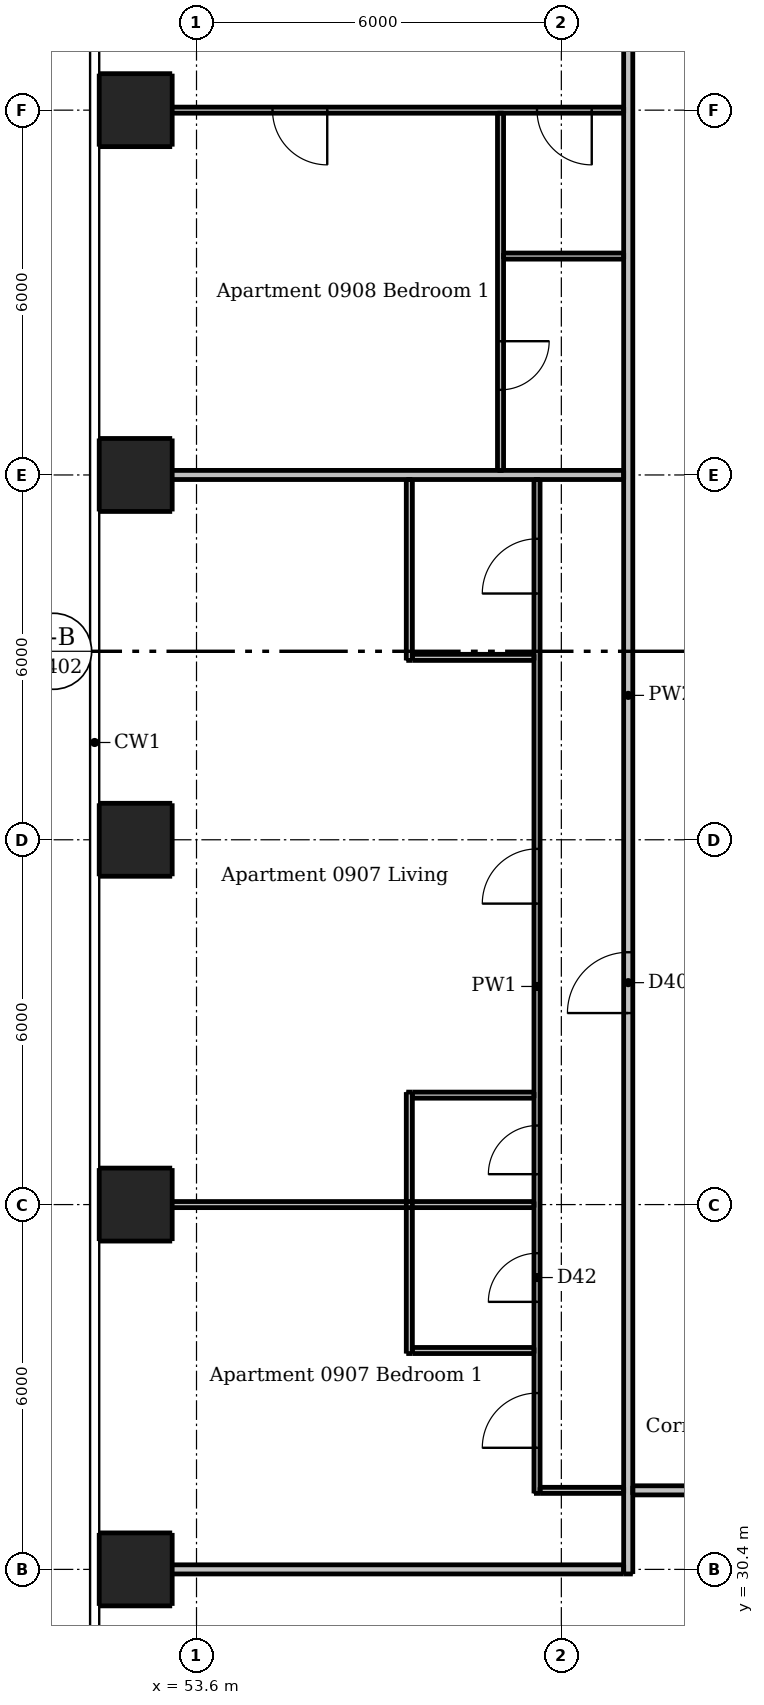
"""IFC4 building model, lengths in metres.
Left out: names, types, materials, properties, quantities, classifications, styles, units other than length and angle.
Written with IfcOpenShell. Run it as: python <this file> out.ifc"""

import sys

from ifc_helpers import new_model, si_unit, direction, frame, frame_2d, origin, origin_2d, place, context, subcontext, project, spatial, rectangle, extrude, element, fill, save


model = new_model("IFC4")
c1 = context("Model", 3, precision=1e-05, world=origin(), true_north=direction((0.0, 1.0)))
c2 = subcontext(c1, "Body", "Model", "MODEL_VIEW")
j1 = project(units=[si_unit("LENGTHUNIT", "METRE"), si_unit("PLANEANGLEUNIT", "RADIAN")], contexts=[c1])
p1 = place(None, origin())
s1 = spatial("IfcSite", under=j1, at=p1, CompositionType="ELEMENT")
p2 = place(p1, origin())
s2 = spatial("IfcBuilding", under=s1, at=p2, CompositionType="ELEMENT")
p3 = place(p2, frame((0.0, 0.0, 36.7)))
s3 = spatial("IfcBuildingStorey", under=s2, at=p3, CompositionType="ELEMENT", Elevation=36.7)
for number, where, z_axis, x_axis in (
    (1, (52.6, 30.4, 0.0), (0.0, 0.0, 1.0), (1.0, 0.0, 0.0)),
    (2, (52.6, 36.4, 0.0), (0.0, 0.0, 1.0), (1.0, 0.0, 0.0)),
    (3, (52.6, 42.4, 0.0), (0.0, 0.0, 1.0), (1.0, 0.0, 0.0)),
    (4, (52.6, 48.4, 0.0), (0.0, 0.0, 1.0), (1.0, 0.0, 0.0)),
    (5, (52.6, 54.4, 0.0), (0.0, 0.0, 1.0), (1.0, 0.0, 0.0)),
):
    element("IfcColumn", number, at=place(p3, frame(where, z_axis=z_axis, x_axis=x_axis)), inside=s3, PredefinedType="COLUMN", context=c2, shape_type="SweptSolid", body=[
        extrude(rectangle(XDim=1.2, YDim=1.2, at=origin_2d()), origin(), (0.0, 0.0, 1.0), 3.05),
    ])
p4 = place(p3, frame((57.1, 33.95, 0.0), z_axis=(0.0, 0.0, 1.0), x_axis=(0.0, 1.0, 0.0)))
e6 = element("IfcWall", 6, at=p4, inside=s3, PredefinedType="PARTITIONING", context=c2, shape_type="SweptSolid", body=[
    extrude(rectangle(XDim=4.3, YDim=0.1, at=frame_2d((2.15, 0.0))), origin(), (0.0, 0.0, 1.0), 3.05),
])
p5 = place(p3, frame((57.1, 45.35, 0.0), z_axis=(0.0, 0.0, 1.0), x_axis=(0.0, 1.0, 0.0)))
e7 = element("IfcWall", 7, at=p5, inside=s3, PredefinedType="PARTITIONING", context=c2, shape_type="SweptSolid", body=[
    extrude(rectangle(XDim=2.975, YDim=0.1, at=frame_2d((1.487, 0.0))), origin(), (0.0, 0.0, 1.0), 3.05),
])
p6 = place(p3, frame((58.6, 54.35, 0.0), z_axis=(0.0, 0.0, 1.0), x_axis=(0.0, -1.0, 0.0)))
e8 = element("IfcWall", 8, at=p6, inside=s3, PredefinedType="PARTITIONING", context=c2, shape_type="SweptSolid", body=[
    extrude(rectangle(XDim=5.875, YDim=0.1, at=frame_2d((2.938, 0.0))), origin(), (0.0, 0.0, 1.0), 3.05),
])
p7 = place(p6, frame((3.75, 0.0, 0.0)))
e9 = element("IfcOpeningElement", 9, at=p7, cuts=e8, PredefinedType="OPENING", context=c2, shape_type="SweptSolid", body=[
    extrude(rectangle(XDim=0.8, YDim=2.1, at=frame_2d((0.4, 1.05))), frame((0.0, 0.06, 0.0), z_axis=(0.0, -1.0, 0.0), x_axis=(1.0, 0.0, 0.0)), (0.0, 0.0, 1.0), 0.12),
])
p8 = place(p3, frame((59.2, 31.65, 0.0), z_axis=(0.0, 0.0, 1.0), x_axis=(0.0, 1.0, 0.0)))
e10 = element("IfcWall", 10, at=p8, inside=s3, PredefinedType="PARTITIONING", context=c2, shape_type="SweptSolid", body=[
    extrude(rectangle(XDim=16.675, YDim=0.1, at=frame_2d((8.337, 0.0))), origin(), (0.0, 0.0, 1.0), 3.05),
])
p9 = place(p8, frame((9.7, 0.0, 0.0)))
e11 = element("IfcOpeningElement", 11, at=p9, cuts=e10, PredefinedType="OPENING", context=c2, shape_type="SweptSolid", body=[
    extrude(rectangle(XDim=0.9, YDim=2.1, at=frame_2d((0.45, 1.05))), frame((0.0, 0.06, 0.0), z_axis=(0.0, -1.0, 0.0), x_axis=(1.0, 0.0, 0.0)), (0.0, 0.0, 1.0), 0.12),
])
p10 = place(p8, frame((14.8, 0.0, 0.0)))
e12 = element("IfcOpeningElement", 12, at=p10, cuts=e10, PredefinedType="OPENING", context=c2, shape_type="SweptSolid", body=[
    extrude(rectangle(XDim=0.9, YDim=2.1, at=frame_2d((0.45, 1.05))), frame((0.0, 0.06, 0.0), z_axis=(0.0, -1.0, 0.0), x_axis=(1.0, 0.0, 0.0)), (0.0, 0.0, 1.0), 0.12),
])
p11 = place(p8, frame((5.25, 0.0, 0.0)))
e13 = element("IfcOpeningElement", 13, at=p11, cuts=e10, PredefinedType="OPENING", context=c2, shape_type="SweptSolid", body=[
    extrude(rectangle(XDim=0.8, YDim=2.1, at=frame_2d((0.4, 1.05))), frame((0.0, 0.06, 0.0), z_axis=(0.0, -1.0, 0.0), x_axis=(1.0, 0.0, 0.0)), (0.0, 0.0, 1.0), 0.12),
])
p12 = place(p8, frame((0.75, 0.0, 0.0)))
e14 = element("IfcOpeningElement", 14, at=p12, cuts=e10, PredefinedType="OPENING", context=c2, shape_type="SweptSolid", body=[
    extrude(rectangle(XDim=0.9, YDim=2.1, at=frame_2d((0.45, 1.05))), frame((0.0, 0.06, 0.0), z_axis=(0.0, -1.0, 0.0), x_axis=(1.0, 0.0, 0.0)), (0.0, 0.0, 1.0), 0.12),
])
p13 = place(p8, frame((3.15, 0.0, 0.0)))
e15 = element("IfcOpeningElement", 15, at=p13, cuts=e10, PredefinedType="OPENING", context=c2, shape_type="SweptSolid", body=[
    extrude(rectangle(XDim=0.8, YDim=2.1, at=frame_2d((0.4, 1.05))), frame((0.0, 0.06, 0.0), z_axis=(0.0, -1.0, 0.0), x_axis=(1.0, 0.0, 0.0)), (0.0, 0.0, 1.0), 0.12),
])
p14 = place(p3, frame((60.625, 54.4, 0.0), z_axis=(0.0, 0.0, 1.0), x_axis=(-1.0, 0.0, 0.0)))
e16 = element("IfcWall", 16, at=p14, inside=s3, PredefinedType="PARTITIONING", context=c2, shape_type="SweptSolid", body=[
    extrude(rectangle(XDim=8.625, YDim=0.1, at=frame_2d((4.312, 0.0))), origin(), (0.0, 0.0, 1.0), 2.516),
])
p15 = place(p14, frame((0.525, 0.0, 0.0)))
e17 = element("IfcOpeningElement", 17, at=p15, cuts=e16, PredefinedType="OPENING", context=c2, shape_type="SweptSolid", body=[
    extrude(rectangle(XDim=0.9, YDim=2.1, at=frame_2d((0.45, 1.05))), frame((0.0, 0.06, 0.0), z_axis=(0.0, -1.0, 0.0), x_axis=(1.0, 0.0, 0.0)), (0.0, 0.0, 1.0), 0.12),
])
p16 = place(p14, frame((4.875, 0.0, 0.0)))
e18 = element("IfcOpeningElement", 18, at=p16, cuts=e16, PredefinedType="OPENING", context=c2, shape_type="SweptSolid", body=[
    extrude(rectangle(XDim=0.9, YDim=2.1, at=frame_2d((0.45, 1.05))), frame((0.0, 0.06, 0.0), z_axis=(0.0, -1.0, 0.0), x_axis=(1.0, 0.0, 0.0)), (0.0, 0.0, 1.0), 0.12),
])
p17 = place(p3, frame((58.65, 52.0, 0.0), z_axis=(0.0, 0.0, 1.0), x_axis=(1.0, 0.0, 0.0)))
e19 = element("IfcWall", 19, at=p17, inside=s3, PredefinedType="PARTITIONING", context=c2, shape_type="SweptSolid", body=[
    extrude(rectangle(XDim=1.975, YDim=0.1, at=frame_2d((0.988, 0.0))), origin(), (0.0, 0.0, 1.0), 3.05),
])
for number, where, z_axis, x_axis in (
    (20, (57.15, 45.4, 0.0), (0.0, 0.0, 1.0), (1.0, 0.0, 0.0)),
    (21, (57.15, 38.2, 0.0), (0.0, 0.0, 1.0), (1.0, 0.0, 0.0)),
):
    element("IfcWall", number, at=place(p3, frame(where, z_axis=z_axis, x_axis=x_axis)), inside=s3, PredefinedType="PARTITIONING", context=c2, shape_type="SweptSolid", body=[
        extrude(rectangle(XDim=2.0, YDim=0.1, at=frame_2d((1.0, 0.0))), origin(), (0.0, 0.0, 1.0), 3.05),
    ])
p18 = place(p3, frame((52.0, 36.4, 0.0), z_axis=(0.0, 0.0, 1.0), x_axis=(1.0, 0.0, 0.0)))
e22 = element("IfcWall", 22, at=p18, inside=s3, PredefinedType="PARTITIONING", context=c2, shape_type="SweptSolid", body=[
    extrude(rectangle(XDim=7.15, YDim=0.1, at=frame_2d((3.575, 0.0))), origin(), (0.0, 0.0, 1.0), 2.516),
])
p19 = place(p3, frame((57.15, 34.0, 0.0), z_axis=(0.0, 0.0, 1.0), x_axis=(1.0, 0.0, 0.0)))
e23 = element("IfcWall", 23, at=p19, inside=s3, PredefinedType="PARTITIONING", context=c2, shape_type="SweptSolid", body=[
    extrude(rectangle(XDim=2.0, YDim=0.1, at=frame_2d((1.0, 0.0))), origin(), (0.0, 0.0, 1.0), 3.05),
])
p20 = place(p3, frame((59.25, 31.7, 0.0), z_axis=(0.0, 0.0, 1.0), x_axis=(1.0, 0.0, 0.0)))
e24 = element("IfcWall", 24, at=p20, inside=s3, PredefinedType="PARTITIONING", context=c2, shape_type="SweptSolid", body=[
    extrude(rectangle(XDim=1.375, YDim=0.1, at=frame_2d((0.688, 0.0))), origin(), (0.0, 0.0, 1.0), 3.05),
])
p21 = place(p3, frame((60.7, 30.325, 0.0), z_axis=(0.0, 0.0, 1.0), x_axis=(0.0, 1.0, 0.0)))
e25 = element("IfcWall", 25, at=p21, inside=s3, PredefinedType="PARTITIONING", context=c2, shape_type="SweptSolid", body=[
    extrude(rectangle(XDim=28.9, YDim=0.15, at=frame_2d((14.45, 0.0))), origin(), (0.0, 0.0, 1.0), 3.05),
])
p22 = place(p21, frame((9.225, 0.0, 0.0)))
e26 = element("IfcOpeningElement", 26, at=p22, cuts=e25, PredefinedType="OPENING", context=c2, shape_type="SweptSolid", body=[
    extrude(rectangle(XDim=1.0, YDim=2.1, at=frame_2d((0.5, 1.05))), frame((0.0, 0.085, 0.0), z_axis=(0.0, -1.0, 0.0), x_axis=(1.0, 0.0, 0.0)), (0.0, 0.0, 1.0), 0.17),
])
p23 = place(p21, frame((26.025, 0.0, 0.0)))
e27 = element("IfcOpeningElement", 27, at=p23, cuts=e25, PredefinedType="OPENING", context=c2, shape_type="SweptSolid", body=[
    extrude(rectangle(XDim=1.0, YDim=2.1, at=frame_2d((0.5, 1.05))), frame((0.0, 0.085, 0.0), z_axis=(0.0, -1.0, 0.0), x_axis=(1.0, 0.0, 0.0)), (0.0, 0.0, 1.0), 0.17),
])
p24 = place(p3, frame((52.0, 48.4, 0.0), z_axis=(0.0, 0.0, 1.0), x_axis=(1.0, 0.0, 0.0)))
e28 = element("IfcWall", 28, at=p24, inside=s3, PredefinedType="PARTITIONING", context=c2, shape_type="SweptSolid", body=[
    extrude(rectangle(XDim=8.625, YDim=0.15, at=frame_2d((4.312, 0.0))), origin(), (0.0, 0.0, 1.0), 2.516),
])
p25 = place(p3, frame((89.525, 31.7, 0.0), z_axis=(0.0, 0.0, 1.0), x_axis=(-1.0, 0.0, 0.0)))
e29 = element("IfcWall", 29, at=p25, inside=s3, PredefinedType="PARTITIONING", context=c2, shape_type="SweptSolid", body=[
    extrude(rectangle(XDim=28.75, YDim=0.15, at=frame_2d((14.375, 0.0))), origin(), (0.0, 0.0, 1.0), 3.05),
])
p26 = place(p25, frame((24.475, 0.0, 0.0)))
e30 = element("IfcOpeningElement", 30, at=p26, cuts=e29, PredefinedType="OPENING", context=c2, shape_type="SweptSolid", body=[
    extrude(rectangle(XDim=1.0, YDim=2.1, at=frame_2d((0.5, 1.05))), frame((0.0, 0.085, 0.0), z_axis=(0.0, -1.0, 0.0), x_axis=(1.0, 0.0, 0.0)), (0.0, 0.0, 1.0), 0.17),
])
p27 = place(p25, frame((7.575, 0.0, 0.0)))
e31 = element("IfcOpeningElement", 31, at=p27, cuts=e29, PredefinedType="OPENING", context=c2, shape_type="SweptSolid", body=[
    extrude(rectangle(XDim=1.0, YDim=2.1, at=frame_2d((0.5, 1.05))), frame((0.0, 0.085, 0.0), z_axis=(0.0, -1.0, 0.0), x_axis=(1.0, 0.0, 0.0)), (0.0, 0.0, 1.0), 0.17),
])
p28 = place(p3, frame((52.0, 30.4, 0.0), z_axis=(0.0, 0.0, 1.0), x_axis=(1.0, 0.0, 0.0)))
e32 = element("IfcWall", 32, at=p28, inside=s3, PredefinedType="PARTITIONING", context=c2, shape_type="SweptSolid", body=[
    extrude(rectangle(XDim=8.625, YDim=0.15, at=frame_2d((4.312, 0.0))), origin(), (0.0, 0.0, 1.0), 2.647),
])
p29 = place(p22, origin())
e33 = element("IfcDoor", 33, at=p29, inside=s3, OperationType="SINGLE_SWING_LEFT", PredefinedType="DOOR", context=c2, shape_type="SweptSolid", body=[
    extrude(rectangle(XDim=1.0, YDim=2.1, at=frame_2d((0.5, 1.05))), frame((0.0, 0.025, 0.0), z_axis=(0.0, -1.0, 0.0), x_axis=(1.0, 0.0, 0.0)), (0.0, 0.0, 1.0), 0.05),
])
fill(e26, e33)
p30 = place(p9, origin())
e34 = element("IfcDoor", 34, at=p30, inside=s3, OperationType="SINGLE_SWING_LEFT", PredefinedType="DOOR", context=c2, shape_type="SweptSolid", body=[
    extrude(rectangle(XDim=0.9, YDim=2.1, at=frame_2d((0.45, 1.05))), frame((0.0, 0.025, 0.0), z_axis=(0.0, -1.0, 0.0), x_axis=(1.0, 0.0, 0.0)), (0.0, 0.0, 1.0), 0.05),
])
fill(e11, e34)
p31 = place(p10, origin())
e35 = element("IfcDoor", 35, at=p31, inside=s3, OperationType="SINGLE_SWING_LEFT", PredefinedType="DOOR", context=c2, shape_type="SweptSolid", body=[
    extrude(rectangle(XDim=0.9, YDim=2.1, at=frame_2d((0.45, 1.05))), frame((0.0, 0.025, 0.0), z_axis=(0.0, -1.0, 0.0), x_axis=(1.0, 0.0, 0.0)), (0.0, 0.0, 1.0), 0.05),
])
fill(e12, e35)
p32 = place(p11, origin())
e36 = element("IfcDoor", 36, at=p32, inside=s3, OperationType="SINGLE_SWING_LEFT", PredefinedType="DOOR", context=c2, shape_type="SweptSolid", body=[
    extrude(rectangle(XDim=0.8, YDim=2.1, at=frame_2d((0.4, 1.05))), frame((0.0, 0.025, 0.0), z_axis=(0.0, -1.0, 0.0), x_axis=(1.0, 0.0, 0.0)), (0.0, 0.0, 1.0), 0.05),
])
fill(e13, e36)
p33 = place(p12, origin())
e37 = element("IfcDoor", 37, at=p33, inside=s3, OperationType="SINGLE_SWING_LEFT", PredefinedType="DOOR", context=c2, shape_type="SweptSolid", body=[
    extrude(rectangle(XDim=0.9, YDim=2.1, at=frame_2d((0.45, 1.05))), frame((0.0, 0.025, 0.0), z_axis=(0.0, -1.0, 0.0), x_axis=(1.0, 0.0, 0.0)), (0.0, 0.0, 1.0), 0.05),
])
fill(e14, e37)
p34 = place(p13, origin())
e38 = element("IfcDoor", 38, at=p34, inside=s3, OperationType="SINGLE_SWING_LEFT", PredefinedType="DOOR", context=c2, shape_type="SweptSolid", body=[
    extrude(rectangle(XDim=0.8, YDim=2.1, at=frame_2d((0.4, 1.05))), frame((0.0, 0.025, 0.0), z_axis=(0.0, -1.0, 0.0), x_axis=(1.0, 0.0, 0.0)), (0.0, 0.0, 1.0), 0.05),
])
fill(e15, e38)
p35 = place(p15, origin())
e39 = element("IfcDoor", 39, at=p35, inside=s3, OperationType="SINGLE_SWING_LEFT", PredefinedType="DOOR", context=c2, shape_type="SweptSolid", body=[
    extrude(rectangle(XDim=0.9, YDim=2.1, at=frame_2d((0.45, 1.05))), frame((0.0, 0.025, 0.0), z_axis=(0.0, -1.0, 0.0), x_axis=(1.0, 0.0, 0.0)), (0.0, 0.0, 1.0), 0.05),
])
fill(e17, e39)
p36 = place(p16, origin())
e40 = element("IfcDoor", 40, at=p36, inside=s3, OperationType="SINGLE_SWING_LEFT", PredefinedType="DOOR", context=c2, shape_type="SweptSolid", body=[
    extrude(rectangle(XDim=0.9, YDim=2.1, at=frame_2d((0.45, 1.05))), frame((0.0, 0.025, 0.0), z_axis=(0.0, -1.0, 0.0), x_axis=(1.0, 0.0, 0.0)), (0.0, 0.0, 1.0), 0.05),
])
fill(e18, e40)
p37 = place(p7, origin())
e41 = element("IfcDoor", 41, at=p37, inside=s3, OperationType="SINGLE_SWING_LEFT", PredefinedType="DOOR", context=c2, shape_type="SweptSolid", body=[
    extrude(rectangle(XDim=0.8, YDim=2.1, at=frame_2d((0.4, 1.05))), frame((0.0, 0.025, 0.0), z_axis=(0.0, -1.0, 0.0), x_axis=(1.0, 0.0, 0.0)), (0.0, 0.0, 1.0), 0.05),
])
fill(e9, e41)
save(model, sys.argv[1])
